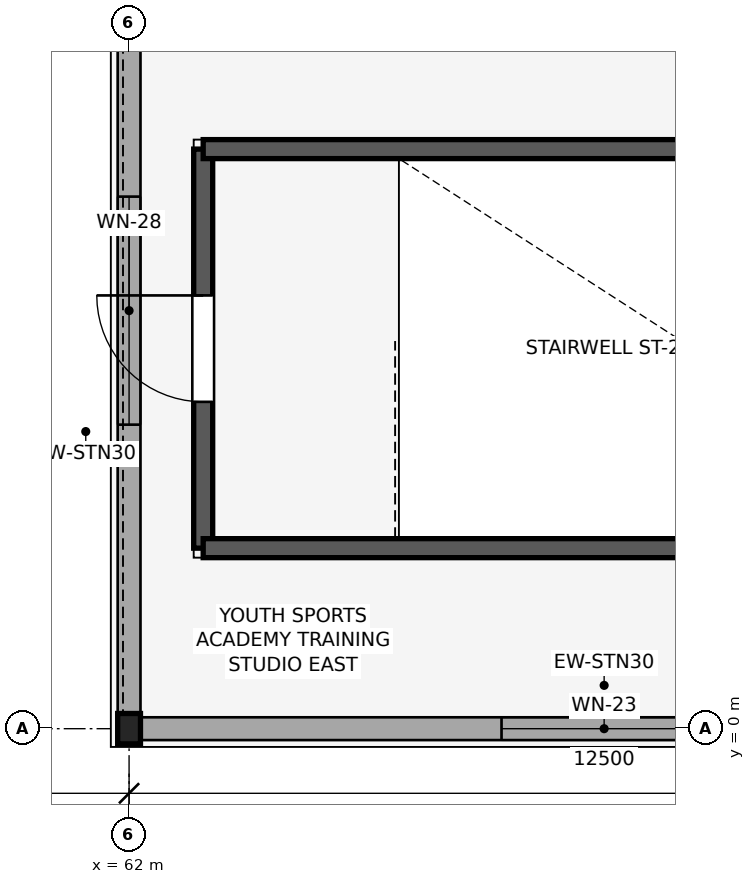
"""IFC4 building model, lengths in metres.
Left out: names, types, materials, properties, quantities, classifications, styles, units other than length and angle.
Written with IfcOpenShell. Run it as: python <this file> out.ifc"""

import sys

from ifc_helpers import new_model, si_unit, direction, frame, frame_2d, origin, origin_2d, place, context, subcontext, project, spatial, rectangle, i_section, extrude, element, fill, save


model = new_model("IFC4")
c1 = context("Model", 3, precision=1e-05, world=origin(), true_north=direction((0.0, 1.0)))
c2 = subcontext(c1, "Body", "Model", "MODEL_VIEW")
j1 = project(units=[si_unit("LENGTHUNIT", "METRE"), si_unit("PLANEANGLEUNIT", "RADIAN")], contexts=[c1])
p1 = place(None, origin())
s1 = spatial("IfcSite", under=j1, at=p1, CompositionType="ELEMENT")
p2 = place(p1, origin())
s2 = spatial("IfcBuilding", under=s1, at=p2, CompositionType="ELEMENT")
p3 = place(p2, frame((0.0, 0.0, 10.6)))
s3 = spatial("IfcBuildingStorey", under=s2, at=p3, CompositionType="ELEMENT", Elevation=10.6)
p4 = place(p3, frame((62.0, 0.0, 0.0), z_axis=(0.0, 0.0, 1.0), x_axis=(1.0, 0.0, 0.0)))
e1 = element("IfcColumn", 1, at=p4, inside=s3, PredefinedType="COLUMN", context=c2, shape_type="SweptSolid", body=[
    extrude(i_section(OverallWidth=0.3, OverallDepth=0.4, WebThickness=0.013, FlangeThickness=0.024, FilletRadius=0.027, at=origin_2d()), origin(), (0.0, 0.0, 1.0), 5.0),
])
p5 = place(p3, frame((62.147, 0.0, 0.0), z_axis=(0.0, 0.0, 1.0), x_axis=(1.0, 0.0, 0.0)))
e2 = element("IfcWall", 2, at=p5, inside=s3, PredefinedType="STANDARD", context=c2, shape_type="SweptSolid", body=[
    extrude(rectangle(XDim=12.206, YDim=0.3, at=frame_2d((6.103, 0.0))), origin(), (0.0, 0.0, 1.0), 4.1),
])
p6 = place(p5, frame((4.753, 0.0, 0.95)))
e3 = element("IfcOpeningElement", 3, at=p6, cuts=e2, PredefinedType="OPENING", context=c2, shape_type="SweptSolid", body=[
    extrude(rectangle(XDim=2.7, YDim=1.85, at=frame_2d((1.35, 0.925))), frame((0.0, 0.16, 0.0), z_axis=(0.0, -1.0, 0.0), x_axis=(1.0, 0.0, 0.0)), (0.0, 0.0, 1.0), 0.32),
])
p7 = place(p3, frame((62.0, 0.197, 0.0), z_axis=(0.0, 0.0, 1.0), x_axis=(0.0, 1.0, 0.0)))
e4 = element("IfcWall", 4, at=p7, inside=s3, PredefinedType="STANDARD", context=c2, shape_type="SweptSolid", body=[
    extrude(rectangle(XDim=10.606, YDim=0.3, at=frame_2d((5.303, 0.0))), origin(), (0.0, 0.0, 1.0), 4.1),
])
p8 = place(p7, frame((3.803, 0.0, 0.95)))
e5 = element("IfcOpeningElement", 5, at=p8, cuts=e4, PredefinedType="OPENING", context=c2, shape_type="SweptSolid", body=[
    extrude(rectangle(XDim=3.0, YDim=2.1, at=frame_2d((1.5, 1.05))), frame((0.0, 0.16, 0.0), z_axis=(0.0, -1.0, 0.0), x_axis=(1.0, 0.0, 0.0)), (0.0, 0.0, 1.0), 0.32),
])
p9 = place(p3, frame((62.975, 7.625, 0.0), z_axis=(0.0, 0.0, 1.0), x_axis=(0.0, -1.0, 0.0)))
e6 = element("IfcWall", 6, at=p9, inside=s3, PredefinedType="SHEAR", context=c2, shape_type="SweptSolid", body=[
    extrude(rectangle(XDim=5.25, YDim=0.25, at=frame_2d((2.625, 0.0))), origin(), (0.0, 0.0, 1.0), 3.2),
])
p10 = place(p9, frame((1.925, 0.0, 0.0)))
e7 = element("IfcOpeningElement", 7, at=p10, cuts=e6, PredefinedType="OPENING", context=c2, shape_type="SweptSolid", body=[
    extrude(rectangle(XDim=1.4, YDim=2.2, at=frame_2d((0.7, 1.1))), frame((0.0, 0.135, 0.0), z_axis=(0.0, -1.0, 0.0), x_axis=(1.0, 0.0, 0.0)), (0.0, 0.0, 1.0), 0.27),
])
for number, where, z_axis, x_axis in (
    (8, (62.975, 2.375, 0.0), (0.0, 0.0, 1.0), (1.0, 0.0, 0.0)),
    (9, (73.425, 7.625, 0.0), (0.0, 0.0, 1.0), (-1.0, 0.0, 0.0)),
):
    element("IfcWall", number, at=place(p3, frame(where, z_axis=z_axis, x_axis=x_axis)), inside=s3, PredefinedType="SHEAR", context=c2, shape_type="SweptSolid", body=[
        extrude(rectangle(XDim=10.45, YDim=0.25, at=frame_2d((5.225, 0.0))), origin(), (0.0, 0.0, 1.0), 3.2),
    ])
p11 = place(p6, origin())
e10 = element("IfcWindow", 10, at=p11, inside=s3, PartitioningType="SINGLE_PANEL", PredefinedType="WINDOW", context=c2, shape_type="SweptSolid", body=[
    extrude(rectangle(XDim=2.7, YDim=1.85, at=frame_2d((1.35, 0.925))), frame((0.0, 0.03, 0.0), z_axis=(0.0, -1.0, 0.0), x_axis=(1.0, 0.0, 0.0)), (0.0, 0.0, 1.0), 0.06),
])
fill(e3, e10)
p12 = place(p8, origin())
e11 = element("IfcWindow", 11, at=p12, inside=s3, PartitioningType="SINGLE_PANEL", PredefinedType="WINDOW", context=c2, shape_type="SweptSolid", body=[
    extrude(rectangle(XDim=3.0, YDim=2.1, at=frame_2d((1.5, 1.05))), frame((0.0, 0.03, 0.0), z_axis=(0.0, -1.0, 0.0), x_axis=(1.0, 0.0, 0.0)), (0.0, 0.0, 1.0), 0.06),
])
fill(e5, e11)
p13 = place(p10, frame((1.4, 0.0, 0.0), z_axis=(0.0, 0.0, 1.0), x_axis=(-1.0, 0.0, 0.0)))
e12 = element("IfcDoor", 12, at=p13, inside=s3, OperationType="SINGLE_SWING_RIGHT", PredefinedType="DOOR", context=c2, shape_type="SweptSolid", body=[
    extrude(rectangle(XDim=1.4, YDim=2.2, at=frame_2d((0.7, 1.1))), frame((0.0, 0.025, 0.0), z_axis=(0.0, -1.0, 0.0), x_axis=(1.0, 0.0, 0.0)), (0.0, 0.0, 1.0), 0.05),
])
fill(e7, e12)
save(model, sys.argv[1])
